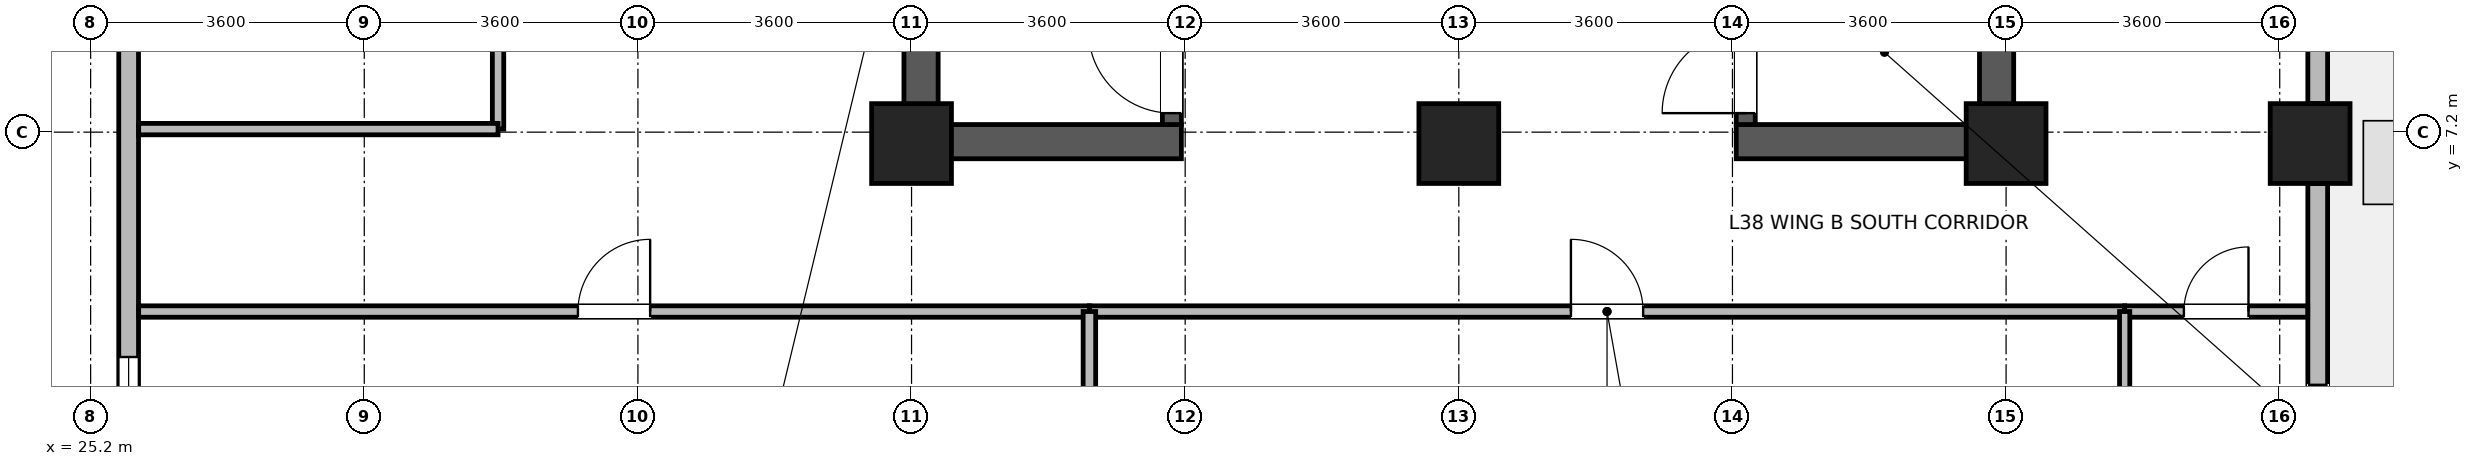
"""IFC4 building model, lengths in metres.
Left out: names, types, materials, properties, quantities, classifications, styles, units other than length and angle.
Written with IfcOpenShell. Run it as: python <this file> out.ifc"""

import sys

from ifc_helpers import new_model, si_unit, direction, frame, frame_2d, origin, origin_2d, place, context, subcontext, project, spatial, rectangle, extrude, source, transform, mapped, element, fill, save


model = new_model("IFC4")
c1 = context("Model", 3, precision=1e-05, world=origin(), true_north=direction((0.0, 1.0)))
c2 = subcontext(c1, "Body", "Model", "MODEL_VIEW")
j1 = project(units=[si_unit("LENGTHUNIT", "METRE"), si_unit("PLANEANGLEUNIT", "RADIAN")], contexts=[c1])
p1 = place(None, origin())
s1 = spatial("IfcSite", under=j1, at=p1, CompositionType="ELEMENT")
p2 = place(p1, origin())
s2 = spatial("IfcBuilding", under=s1, at=p2, CompositionType="ELEMENT")
p3 = place(p2, frame((0.0, 0.0, 151.3)))
s3 = spatial("IfcBuildingStorey", under=s2, at=p3, CompositionType="ELEMENT", Elevation=151.3)
for number, where, z_axis, x_axis in (
    (1, (36.125, 6.85, 0.0), (0.0, 0.0, 1.0), (0.0, 1.0, 0.0)),
    (2, (50.275, 6.85, 0.0), (0.0, 0.0, 1.0), (0.0, 1.0, 0.0)),
):
    element("IfcWall", number, at=place(p3, frame(where, z_axis=z_axis, x_axis=x_axis)), inside=s3, PredefinedType="SHEAR", context=c2, shape_type="SweptSolid", body=[
        extrude(rectangle(XDim=7.9, YDim=0.45, at=frame_2d((3.95, 0.0))), origin(), (0.0, 0.0, 1.0), 3.46),
    ])
for number, where, z_axis, x_axis in (
    (3, (36.35, 7.075, 0.0), (0.0, 0.0, 1.0), (1.0, 0.0, 0.0)),
    (4, (46.85, 7.075, 0.0), (0.0, 0.0, 1.0), (1.0, 0.0, 0.0)),
):
    element("IfcWall", number, at=place(p3, frame(where, z_axis=z_axis, x_axis=x_axis)), inside=s3, PredefinedType="SHEAR", context=c2, shape_type="SweptSolid", body=[
        extrude(rectangle(XDim=3.2, YDim=0.45, at=frame_2d((1.6, 0.0))), origin(), (0.0, 0.0, 1.0), 3.46),
    ])
p4 = place(p3, frame((39.425, 7.3, 0.0), z_axis=(0.0, 0.0, 1.0), x_axis=(0.0, 1.0, 0.0)))
e5 = element("IfcWall", 5, at=p4, inside=s3, PredefinedType="SHEAR", context=c2, shape_type="SweptSolid", body=[
    extrude(rectangle(XDim=7.0, YDim=0.25, at=frame_2d((3.5, 0.0))), origin(), (0.0, 0.0, 1.0), 3.46),
])
p5 = place(p4, frame((0.15, 0.0, 0.0)))
e6 = element("IfcOpeningElement", 6, at=p5, cuts=e5, PredefinedType="OPENING", context=c2, shape_type="SweptSolid", body=[
    extrude(rectangle(XDim=1.1, YDim=2.08, at=frame_2d((0.55, 1.04))), frame((0.0, 0.135, 0.0), z_axis=(0.0, -1.0, 0.0), x_axis=(1.0, 0.0, 0.0)), (0.0, 0.0, 1.0), 0.27),
])
p6 = place(p3, frame((46.975, 7.3, 0.0), z_axis=(0.0, 0.0, 1.0), x_axis=(0.0, 1.0, 0.0)))
e7 = element("IfcWall", 7, at=p6, inside=s3, PredefinedType="SHEAR", context=c2, shape_type="SweptSolid", body=[
    extrude(rectangle(XDim=7.0, YDim=0.25, at=frame_2d((3.5, 0.0))), origin(), (0.0, 0.0, 1.0), 3.46),
])
p7 = place(p6, frame((0.15, 0.0, 0.0)))
e8 = element("IfcOpeningElement", 8, at=p7, cuts=e7, PredefinedType="OPENING", context=c2, shape_type="SweptSolid", body=[
    extrude(rectangle(XDim=1.1, YDim=2.08, at=frame_2d((0.55, 1.04))), frame((0.0, 0.135, 0.0), z_axis=(0.0, -1.0, 0.0), x_axis=(1.0, 0.0, 0.0)), (0.0, 0.0, 1.0), 0.27),
])
m1 = source(origin(), c2, "Body", "SweptSolid", [
    extrude(rectangle(XDim=1.05, YDim=1.05, at=origin_2d()), origin(), (0.0, 0.0, 1.0), 3.7),
])
for number, where, z_axis, x_axis in (
    (9, (36.0, 7.05, 0.0), (0.0, 0.0, 1.0), (1.0, 0.0, 0.0)),
    (10, (43.2, 7.05, 0.0), (0.0, 0.0, 1.0), (1.0, 0.0, 0.0)),
    (11, (50.4, 7.05, 0.0), (0.0, 0.0, 1.0), (1.0, 0.0, 0.0)),
    (12, (54.4, 7.05, 0.0), (0.0, 0.0, 1.0), (1.0, 0.0, 0.0)),
):
    element("IfcColumn", number, at=place(p3, frame(where, z_axis=z_axis, x_axis=x_axis)), inside=s3, PredefinedType="COLUMN", context=c2, shape_type="MappedRepresentation", body=[
        mapped(m1, transform((0.0, 0.0, 0.0), x_axis=(1.0, 0.0, 0.0), y_axis=(0.0, 1.0, 0.0), z_axis=(0.0, 0.0, 1.0), scale=1.0)),
    ])
p8 = place(p3, frame((54.5, 6.524, 0.0), z_axis=(0.0, 0.0, 1.0), x_axis=(0.0, -1.0, 0.0)))
e13 = element("IfcWall", 13, at=p8, inside=s3, PredefinedType="STANDARD", context=c2, shape_type="SweptSolid", body=[
    extrude(rectangle(XDim=4.854, YDim=0.26, at=frame_2d((2.427, 0.0))), origin(), (0.0, 0.0, 1.0), 3.44),
])
p9 = place(p8, frame((2.648, 0.0, 0.0)))
e14 = element("IfcOpeningElement", 14, at=p9, cuts=e13, PredefinedType="OPENING", context=c2, shape_type="SweptSolid", body=[
    extrude(rectangle(XDim=1.5, YDim=2.15, at=frame_2d((0.75, 1.075))), frame((0.0, 0.14, 0.0), z_axis=(0.0, -1.0, 0.0), x_axis=(1.0, 0.0, 0.0)), (0.0, 0.0, 1.0), 0.28),
])
p10 = place(p3, frame((54.5, 14.024, 0.0), z_axis=(0.0, 0.0, 1.0), x_axis=(0.0, -1.0, 0.0)))
e15 = element("IfcWall", 15, at=p10, inside=s3, PredefinedType="STANDARD", context=c2, shape_type="SweptSolid", body=[
    extrude(rectangle(XDim=6.448, YDim=0.26, at=frame_2d((3.224, 0.0))), origin(), (0.0, 0.0, 1.0), 2.99),
])
p11 = place(p10, frame((3.936, 0.0, 0.85)))
e16 = element("IfcOpeningElement", 16, at=p11, cuts=e15, PredefinedType="OPENING", context=c2, shape_type="SweptSolid", body=[
    extrude(rectangle(XDim=1.8, YDim=1.85, at=frame_2d((0.9, 0.925))), frame((0.0, 0.14, 0.0), z_axis=(0.0, -1.0, 0.0), x_axis=(1.0, 0.0, 0.0)), (0.0, 0.0, 1.0), 0.28),
])
p12 = place(p10, frame((1.15, 0.0, 0.85)))
e17 = element("IfcOpeningElement", 17, at=p12, cuts=e15, PredefinedType="OPENING", context=c2, shape_type="SweptSolid", body=[
    extrude(rectangle(XDim=0.95, YDim=1.75, at=frame_2d((0.475, 0.875))), frame((0.0, 0.14, 0.0), z_axis=(0.0, -1.0, 0.0), x_axis=(1.0, 0.0, 0.0)), (0.0, 0.0, 1.0), 0.28),
])
p13 = place(p3, frame((25.7, 1.67, 0.0), z_axis=(0.0, 0.0, 1.0), x_axis=(0.0, 1.0, 0.0)))
e18 = element("IfcWall", 18, at=p13, inside=s3, PredefinedType="STANDARD", context=c2, shape_type="SweptSolid", body=[
    extrude(rectangle(XDim=20.06, YDim=0.26, at=frame_2d((10.03, 0.0))), origin(), (0.0, 0.0, 1.0), 3.44),
])
p14 = place(p13, frame((0.772, 0.0, 0.85)))
e19 = element("IfcOpeningElement", 19, at=p14, cuts=e18, PredefinedType="OPENING", context=c2, shape_type="SweptSolid", body=[
    extrude(rectangle(XDim=1.8, YDim=1.85, at=frame_2d((0.9, 0.925))), frame((0.0, 0.14, 0.0), z_axis=(0.0, -1.0, 0.0), x_axis=(1.0, 0.0, 0.0)), (0.0, 0.0, 1.0), 0.28),
])
p15 = place(p13, frame((7.458, 0.0, 0.85)))
e20 = element("IfcOpeningElement", 20, at=p15, cuts=e18, PredefinedType="OPENING", context=c2, shape_type="SweptSolid", body=[
    extrude(rectangle(XDim=1.8, YDim=1.85, at=frame_2d((0.9, 0.925))), frame((0.0, 0.14, 0.0), z_axis=(0.0, -1.0, 0.0), x_axis=(1.0, 0.0, 0.0)), (0.0, 0.0, 1.0), 0.28),
])
p16 = place(p13, frame((14.145, 0.0, 0.85)))
e21 = element("IfcOpeningElement", 21, at=p16, cuts=e18, PredefinedType="OPENING", context=c2, shape_type="SweptSolid", body=[
    extrude(rectangle(XDim=1.8, YDim=1.85, at=frame_2d((0.9, 0.925))), frame((0.0, 0.14, 0.0), z_axis=(0.0, -1.0, 0.0), x_axis=(1.0, 0.0, 0.0)), (0.0, 0.0, 1.0), 0.28),
])
p17 = place(p13, frame((17.488, 0.0, 0.85)))
e22 = element("IfcOpeningElement", 22, at=p17, cuts=e18, PredefinedType="OPENING", context=c2, shape_type="SweptSolid", body=[
    extrude(rectangle(XDim=1.8, YDim=1.85, at=frame_2d((0.9, 0.925))), frame((0.0, 0.14, 0.0), z_axis=(0.0, -1.0, 0.0), x_axis=(1.0, 0.0, 0.0)), (0.0, 0.0, 1.0), 0.28),
])
p18 = place(p3, frame((38.34, 4.84, 0.0), z_axis=(0.0, 0.0, 1.0), x_axis=(1.0, 0.0, 0.0)))
e23 = element("IfcWall", 23, at=p18, inside=s3, PredefinedType="PARTITIONING", context=c2, shape_type="SweptSolid", body=[
    extrude(rectangle(XDim=13.62, YDim=0.15, at=frame_2d((6.81, 0.0))), origin(), (0.0, 0.0, 1.0), 3.44),
])
p19 = place(p18, frame((6.335, 0.0, 0.0)))
e24 = element("IfcOpeningElement", 24, at=p19, cuts=e23, PredefinedType="OPENING", context=c2, shape_type="SweptSolid", body=[
    extrude(rectangle(XDim=0.95, YDim=2.1, at=frame_2d((0.475, 1.05))), frame((0.0, 0.085, 0.0), z_axis=(0.0, -1.0, 0.0), x_axis=(1.0, 0.0, 0.0)), (0.0, 0.0, 1.0), 0.17),
])
p20 = place(p3, frame((25.832, 4.84, 0.0), z_axis=(0.0, 0.0, 1.0), x_axis=(1.0, 0.0, 0.0)))
e25 = element("IfcWall", 25, at=p20, inside=s3, PredefinedType="PARTITIONING", context=c2, shape_type="SweptSolid", body=[
    extrude(rectangle(XDim=12.508, YDim=0.15, at=frame_2d((6.254, 0.0))), origin(), (0.0, 0.0, 1.0), 3.44),
])
p21 = place(p20, frame((5.779, 0.0, 0.0)))
e26 = element("IfcOpeningElement", 26, at=p21, cuts=e25, PredefinedType="OPENING", context=c2, shape_type="SweptSolid", body=[
    extrude(rectangle(XDim=0.95, YDim=2.1, at=frame_2d((0.475, 1.05))), frame((0.0, 0.085, 0.0), z_axis=(0.0, -1.0, 0.0), x_axis=(1.0, 0.0, 0.0)), (0.0, 0.0, 1.0), 0.17),
])
p22 = place(p3, frame((30.56, 7.24, 0.0), z_axis=(0.0, 0.0, 1.0), x_axis=(0.0, 1.0, 0.0)))
e27 = element("IfcWall", 27, at=p22, inside=s3, PredefinedType="PARTITIONING", context=c2, shape_type="SweptSolid", body=[
    extrude(rectangle(XDim=7.26, YDim=0.15, at=frame_2d((3.63, 0.0))), origin(), (0.0, 0.0, 1.0), 3.44),
])
p23 = place(p22, frame((2.98, 0.0, 0.0)))
e28 = element("IfcOpeningElement", 28, at=p23, cuts=e27, PredefinedType="OPENING", context=c2, shape_type="SweptSolid", body=[
    extrude(rectangle(XDim=1.3, YDim=2.12, at=frame_2d((0.65, 1.06))), frame((0.0, 0.085, 0.0), z_axis=(0.0, -1.0, 0.0), x_axis=(1.0, 0.0, 0.0)), (0.0, 0.0, 1.0), 0.17),
])
p24 = place(p3, frame((25.832, 7.24, 0.0), z_axis=(0.0, 0.0, 1.0), x_axis=(1.0, 0.0, 0.0)))
e29 = element("IfcWall", 29, at=p24, inside=s3, PredefinedType="PARTITIONING", context=c2, shape_type="SweptSolid", body=[
    extrude(rectangle(XDim=4.728, YDim=0.15, at=frame_2d((2.364, 0.0))), origin(), (0.0, 0.0, 1.0), 3.44),
])
p25 = place(p3, frame((51.96, 4.84, 0.0), z_axis=(0.0, 0.0, 1.0), x_axis=(1.0, 0.0, 0.0)))
e30 = element("IfcWall", 30, at=p25, inside=s3, PredefinedType="PARTITIONING", context=c2, shape_type="SweptSolid", body=[
    extrude(rectangle(XDim=2.408, YDim=0.15, at=frame_2d((1.204, 0.0))), origin(), (0.0, 0.0, 1.0), 3.44),
])
p26 = place(p25, frame((0.779, 0.0, 0.0)))
e31 = element("IfcOpeningElement", 31, at=p26, cuts=e30, PredefinedType="OPENING", context=c2, shape_type="SweptSolid", body=[
    extrude(rectangle(XDim=0.85, YDim=2.04, at=frame_2d((0.425, 1.02))), frame((0.0, 0.085, 0.0), z_axis=(0.0, -1.0, 0.0), x_axis=(1.0, 0.0, 0.0)), (0.0, 0.0, 1.0), 0.17),
])
p27 = place(p3, frame((38.34, 1.932, 0.0), z_axis=(0.0, 0.0, 1.0), x_axis=(0.0, 1.0, 0.0)))
e32 = element("IfcWall", 32, at=p27, inside=s3, PredefinedType="PARTITIONING", context=c2, shape_type="SweptSolid", body=[
    extrude(rectangle(XDim=2.908, YDim=0.165, at=frame_2d((1.454, 0.0))), origin(), (0.0, 0.0, 1.0), 3.44),
])
p28 = place(p3, frame((51.96, 1.932, 0.0), z_axis=(0.0, 0.0, 1.0), x_axis=(0.0, 1.0, 0.0)))
e33 = element("IfcWall", 33, at=p28, inside=s3, PredefinedType="PARTITIONING", context=c2, shape_type="SweptSolid", body=[
    extrude(rectangle(XDim=2.908, YDim=0.135, at=frame_2d((1.454, 0.0))), origin(), (0.0, 0.0, 1.0), 3.44),
])
p29 = place(p9, origin())
e34 = element("IfcDoor", 34, at=p29, inside=s3, OperationType="SLIDING_TO_LEFT", PredefinedType="DOOR", context=c2, shape_type="SweptSolid", body=[
    extrude(rectangle(XDim=1.5, YDim=2.15, at=frame_2d((0.75, 1.075))), frame((0.0, 0.025, 0.0), z_axis=(0.0, -1.0, 0.0), x_axis=(1.0, 0.0, 0.0)), (0.0, 0.0, 1.0), 0.05),
])
fill(e14, e34)
p30 = place(p14, origin())
e35 = element("IfcWindow", 35, at=p30, inside=s3, PartitioningType="SINGLE_PANEL", PredefinedType="WINDOW", context=c2, shape_type="SweptSolid", body=[
    extrude(rectangle(XDim=1.8, YDim=1.85, at=frame_2d((0.9, 0.925))), frame((0.0, 0.03, 0.0), z_axis=(0.0, -1.0, 0.0), x_axis=(1.0, 0.0, 0.0)), (0.0, 0.0, 1.0), 0.06),
])
fill(e19, e35)
p31 = place(p5, origin())
e36 = element("IfcDoor", 36, at=p31, inside=s3, OperationType="SINGLE_SWING_RIGHT", PredefinedType="DOOR", context=c2, shape_type="SweptSolid", body=[
    extrude(rectangle(XDim=1.1, YDim=2.08, at=frame_2d((0.55, 1.04))), frame((0.0, 0.025, 0.0), z_axis=(0.0, -1.0, 0.0), x_axis=(1.0, 0.0, 0.0)), (0.0, 0.0, 1.0), 0.05),
])
fill(e6, e36)
p32 = place(p7, origin())
e37 = element("IfcDoor", 37, at=p32, inside=s3, OperationType="SINGLE_SWING_LEFT", PredefinedType="DOOR", context=c2, shape_type="SweptSolid", body=[
    extrude(rectangle(XDim=1.1, YDim=2.08, at=frame_2d((0.55, 1.04))), frame((0.0, 0.025, 0.0), z_axis=(0.0, -1.0, 0.0), x_axis=(1.0, 0.0, 0.0)), (0.0, 0.0, 1.0), 0.05),
])
fill(e8, e37)
p33 = place(p19, origin())
e38 = element("IfcDoor", 38, at=p33, inside=s3, OperationType="SINGLE_SWING_LEFT", PredefinedType="DOOR", context=c2, shape_type="SweptSolid", body=[
    extrude(rectangle(XDim=0.95, YDim=2.1, at=frame_2d((0.475, 1.05))), frame((0.0, 0.025, 0.0), z_axis=(0.0, -1.0, 0.0), x_axis=(1.0, 0.0, 0.0)), (0.0, 0.0, 1.0), 0.05),
])
fill(e24, e38)
p34 = place(p21, origin())
e39 = element("IfcDoor", 39, at=p34, inside=s3, OperationType="SINGLE_SWING_RIGHT", PredefinedType="DOOR", context=c2, shape_type="SweptSolid", body=[
    extrude(rectangle(XDim=0.95, YDim=2.1, at=frame_2d((0.475, 1.05))), frame((0.0, 0.025, 0.0), z_axis=(0.0, -1.0, 0.0), x_axis=(1.0, 0.0, 0.0)), (0.0, 0.0, 1.0), 0.05),
])
fill(e26, e39)
p35 = place(p26, origin())
e40 = element("IfcDoor", 40, at=p35, inside=s3, OperationType="SINGLE_SWING_RIGHT", PredefinedType="DOOR", context=c2, shape_type="SweptSolid", body=[
    extrude(rectangle(XDim=0.85, YDim=2.04, at=frame_2d((0.425, 1.02))), frame((0.0, 0.025, 0.0), z_axis=(0.0, -1.0, 0.0), x_axis=(1.0, 0.0, 0.0)), (0.0, 0.0, 1.0), 0.05),
])
fill(e31, e40)
save(model, sys.argv[1])
